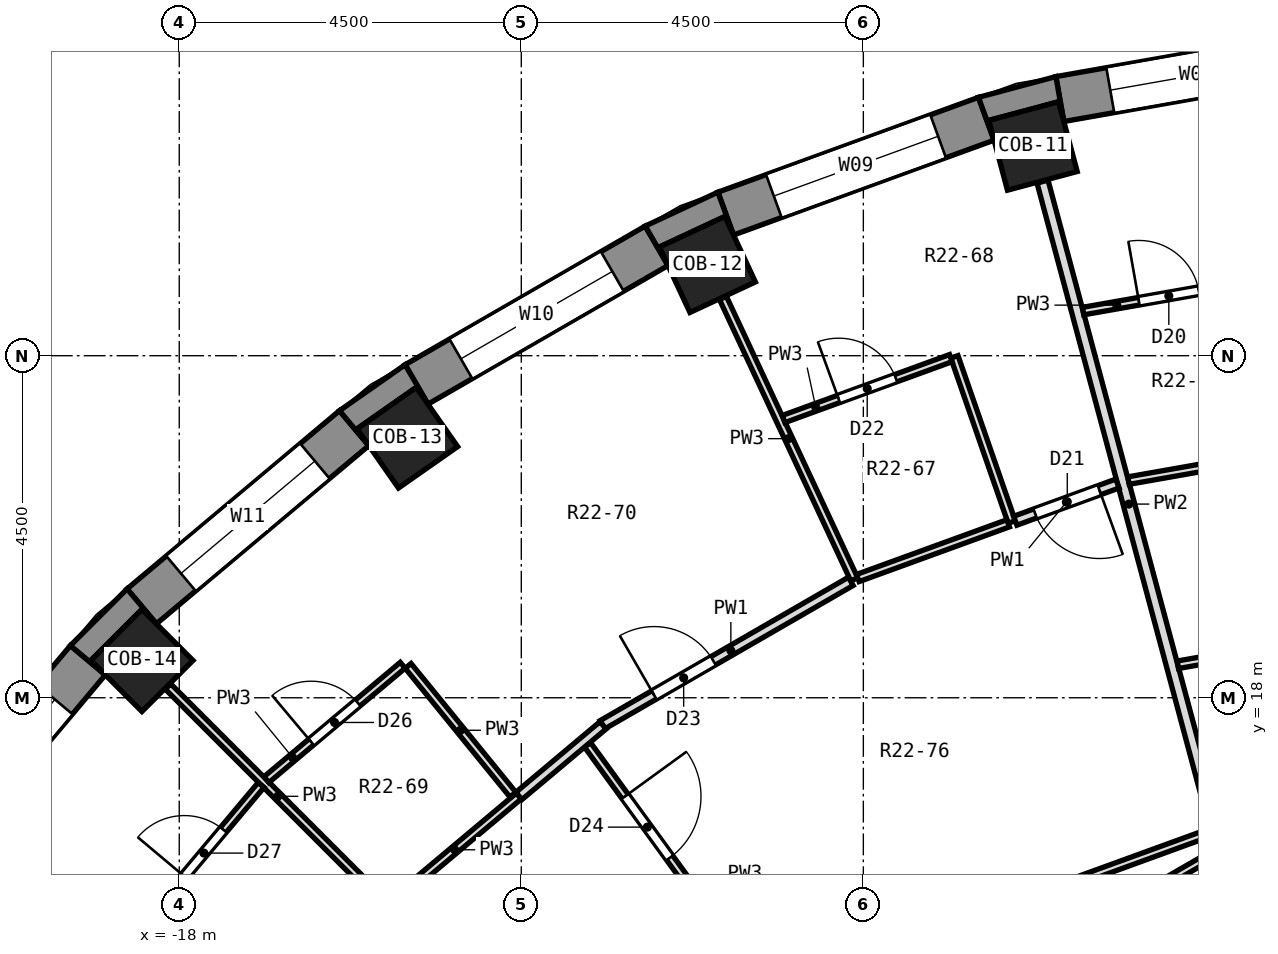
"""IFC4 building model, lengths in metres.
Left out: names, types, materials, properties, quantities, classifications, styles, units other than length and angle.
Written with IfcOpenShell. Run it as: python <this file> out.ifc"""

import sys

from ifc_helpers import new_model, si_unit, direction, frame, frame_2d, origin, origin_2d, place, context, subcontext, project, spatial, polyline, rectangle, outline, extrude, element, fill, save


model = new_model("IFC4")
c1 = context("Model", 3, precision=1e-05, world=origin(), true_north=direction((0.0, 1.0)))
c2 = subcontext(c1, "Body", "Model", "MODEL_VIEW")
j1 = project(units=[si_unit("LENGTHUNIT", "METRE"), si_unit("PLANEANGLEUNIT", "RADIAN")], contexts=[c1])
p1 = place(None, origin())
s1 = spatial("IfcSite", under=j1, at=p1, CompositionType="ELEMENT")
p2 = place(p1, origin())
s2 = spatial("IfcBuilding", under=s1, at=p2, CompositionType="ELEMENT")
p3 = place(p2, frame((0.0, 0.0, 141.4)))
s3 = spatial("IfcBuildingStorey", under=s2, at=p3, CompositionType="ELEMENT", Elevation=141.4)
for number, where, z_axis, x_axis in (
    (1, (-6.768, 25.259, 0.0), (0.0, 0.0, 1.0), (-0.259, 0.966, 0.0)),
    (2, (-11.052, 23.7, 0.0), (0.0, 0.0, 1.0), (-0.423, 0.906, 0.0)),
    (3, (-14.999, 21.421, 0.0), (0.0, 0.0, 1.0), (-0.574, 0.819, 0.0)),
    (4, (-18.491, 18.491, 0.0), (0.0, 0.0, 1.0), (-0.707, 0.707, 0.0)),
):
    element("IfcColumn", number, at=place(p3, frame(where, z_axis=z_axis, x_axis=x_axis)), inside=s3, PredefinedType="COLUMN", context=c2, shape_type="SweptSolid", body=[
        extrude(rectangle(XDim=0.95, YDim=0.95, at=origin_2d()), origin(), (0.0, 0.0, 1.0), 3.3),
    ])
p4 = place(p3, frame((-2.822, 26.51, 0.0), z_axis=(0.0, 0.0, 1.0), x_axis=(-0.984803764455, -0.173670796382, 0.0)))
e5 = element("IfcWall", 5, at=p4, inside=s3, PredefinedType="SOLIDWALL", context=c2, shape_type="SweptSolid", body=[
    extrude(rectangle(XDim=3.648, YDim=0.6, at=frame_2d((1.824, 0.0))), origin(), (0.0, 0.0, 1.0), 2.8),
])
p5 = place(p4, frame((0.674, 0.0, 0.9)))
e6 = element("IfcOpeningElement", 6, at=p5, cuts=e5, PredefinedType="OPENING", context=c2, shape_type="SweptSolid", body=[
    extrude(rectangle(XDim=2.3, YDim=1.8, at=frame_2d((1.15, 0.9))), frame((0.0, 0.312, 0.0), z_axis=(0.0, -1.0, 0.0), x_axis=(1.0, 0.0, 0.0)), (0.0, 0.0, 1.0), 0.624),
])
p6 = place(p3, frame((-7.383, 25.617, 0.0), z_axis=(0.0, 0.0, 1.0), x_axis=(-0.939703505393, -0.341990236633, 0.0)))
e7 = element("IfcWall", 7, at=p6, inside=s3, PredefinedType="SOLIDWALL", context=c2, shape_type="SweptSolid", body=[
    extrude(rectangle(XDim=3.648, YDim=0.6, at=frame_2d((1.824, 0.0))), origin(), (0.0, 0.0, 1.0), 2.8),
])
p7 = place(p6, frame((0.674, 0.0, 0.9)))
e8 = element("IfcOpeningElement", 8, at=p7, cuts=e7, PredefinedType="OPENING", context=c2, shape_type="SweptSolid", body=[
    extrude(rectangle(XDim=2.3, YDim=1.8, at=frame_2d((1.15, 0.9))), frame((0.0, 0.312, 0.0), z_axis=(0.0, -1.0, 0.0), x_axis=(1.0, 0.0, 0.0)), (0.0, 0.0, 1.0), 0.624),
])
p8 = place(p3, frame((-11.719, 23.946, 0.0), z_axis=(0.0, 0.0, 1.0), x_axis=(-0.866051847062, -0.499954196102, 0.0)))
e9 = element("IfcWall", 9, at=p8, inside=s3, PredefinedType="SOLIDWALL", context=c2, shape_type="SweptSolid", body=[
    extrude(rectangle(XDim=3.648, YDim=0.6, at=frame_2d((1.824, 0.0))), origin(), (0.0, 0.0, 1.0), 2.8),
])
p9 = place(p8, frame((0.674, 0.0, 0.9)))
e10 = element("IfcOpeningElement", 10, at=p9, cuts=e9, PredefinedType="OPENING", context=c2, shape_type="SweptSolid", body=[
    extrude(rectangle(XDim=2.3, YDim=1.8, at=frame_2d((1.15, 0.9))), frame((0.0, 0.312, 0.0), z_axis=(0.0, -1.0, 0.0), x_axis=(1.0, 0.0, 0.0)), (0.0, 0.0, 1.0), 0.624),
])
p10 = place(p3, frame((-15.699, 21.547, 0.0), z_axis=(0.0, 0.0, 1.0), x_axis=(-0.766055462616, -0.642774476932, 0.0)))
e11 = element("IfcWall", 11, at=p10, inside=s3, PredefinedType="SOLIDWALL", context=c2, shape_type="SweptSolid", body=[
    extrude(rectangle(XDim=3.648, YDim=0.6, at=frame_2d((1.824, 0.0))), origin(), (0.0, 0.0, 1.0), 2.8),
])
p11 = place(p10, frame((0.674, 0.0, 0.9)))
e12 = element("IfcOpeningElement", 12, at=p11, cuts=e11, PredefinedType="OPENING", context=c2, shape_type="SweptSolid", body=[
    extrude(rectangle(XDim=2.3, YDim=1.8, at=frame_2d((1.15, 0.9))), frame((0.0, 0.312, 0.0), z_axis=(0.0, -1.0, 0.0), x_axis=(1.0, 0.0, 0.0)), (0.0, 0.0, 1.0), 0.624),
])
p12 = place(p3, frame((-19.202, 18.494, 0.0), z_axis=(0.0, 0.0, 1.0), x_axis=(-0.642774476932, -0.766055462616, 0.0)))
e13 = element("IfcWall", 13, at=p12, inside=s3, PredefinedType="SOLIDWALL", context=c2, shape_type="SweptSolid", body=[
    extrude(rectangle(XDim=3.648, YDim=0.6, at=frame_2d((1.824, 0.0))), origin(), (0.0, 0.0, 1.0), 2.8),
])
p13 = place(p12, frame((0.674, 0.0, 0.9)))
e14 = element("IfcOpeningElement", 14, at=p13, cuts=e13, PredefinedType="OPENING", context=c2, shape_type="SweptSolid", body=[
    extrude(rectangle(XDim=2.3, YDim=1.8, at=frame_2d((1.15, 0.9))), frame((0.0, 0.312, 0.0), z_axis=(0.0, -1.0, 0.0), x_axis=(1.0, 0.0, 0.0)), (0.0, 0.0, 1.0), 0.624),
])
p14 = place(p3, origin())
e15 = element("IfcWall", 15, at=p14, inside=s3, PredefinedType="SOLIDWALL", context=c2, shape_type="SweptSolid", body=[
    extrude(outline(polyline([(-6.467, 26.172), (-7.486, 25.899), (-7.28, 25.335), (-7.35, 25.595), (-6.432, 25.841), (-6.363, 25.581), (-6.467, 26.172)])), origin(), (0.0, 0.0, 1.0), 2.8),
])
p15 = place(p3, origin())
e16 = element("IfcWall", 16, at=p15, inside=s3, PredefinedType="SOLIDWALL", context=c2, shape_type="SweptSolid", body=[
    extrude(outline(polyline([(-10.913, 24.651), (-11.869, 24.206), (-11.569, 23.686), (-11.683, 23.93), (-10.822, 24.331), (-10.708, 24.087), (-10.913, 24.651)])), origin(), (0.0, 0.0, 1.0), 2.8),
])
p16 = place(p3, origin())
e17 = element("IfcWall", 17, at=p16, inside=s3, PredefinedType="SOLIDWALL", context=c2, shape_type="SweptSolid", body=[
    extrude(outline(polyline([(-15.892, 21.777), (-15.506, 21.317), (-15.661, 21.538), (-14.882, 22.083), (-14.728, 21.862), (-15.028, 22.382), (-15.892, 21.777)])), origin(), (0.0, 0.0, 1.0), 2.8),
])
p17 = place(p3, origin())
e18 = element("IfcWall", 18, at=p17, inside=s3, PredefinedType="SOLIDWALL", context=c2, shape_type="SweptSolid", body=[
    extrude(outline(polyline([(-18.686, 19.432), (-19.432, 18.686), (-18.972, 18.301), (-19.163, 18.491), (-18.491, 19.163), (-18.301, 18.972), (-18.686, 19.432)])), origin(), (0.0, 0.0, 1.0), 2.8),
])
p18 = place(p3, frame((-6.643, 24.791, 0.0), z_axis=(0.0, 0.0, 1.0), x_axis=(0.258629569049, -0.965976576328, 0.0)))
e19 = element("IfcWall", 19, at=p18, inside=s3, PredefinedType="PARTITIONING", context=c2, shape_type="SweptSolid", body=[
    extrude(rectangle(XDim=8.784, YDim=0.15, at=frame_2d((4.392, 0.0))), origin(), (0.0, 0.0, 1.0), 2.8),
])
p19 = place(p3, frame((-7.802, 22.485, 0.0), z_axis=(0.0, 0.0, 1.0), x_axis=(0.327763034971, -0.944759965762, 0.0)))
e20 = element("IfcWall", 20, at=p19, inside=s3, PredefinedType="PARTITIONING", context=c2, shape_type="SweptSolid", body=[
    extrude(rectangle(XDim=2.3, YDim=0.1, at=frame_2d((1.15, 0.0))), origin(), (0.0, 0.0, 1.0), 2.8),
])
p20 = place(p3, frame((-10.847, 23.26, 0.0), z_axis=(0.0, 0.0, 1.0), x_axis=(0.422784035137, -0.906230467173, 0.0)))
e21 = element("IfcWall", 21, at=p20, inside=s3, PredefinedType="PARTITIONING", context=c2, shape_type="SweptSolid", body=[
    extrude(rectangle(XDim=4.085, YDim=0.1, at=frame_2d((2.042, 0.0))), origin(), (0.0, 0.0, 1.0), 2.8),
])
p21 = place(p3, frame((-12.629, 17.382, 0.0), z_axis=(0.0, 0.0, 1.0), x_axis=(0.587934886014, -0.808908257967, 0.0)))
e22 = element("IfcWall", 22, at=p21, inside=s3, PredefinedType="PARTITIONING", context=c2, shape_type="SweptSolid", body=[
    extrude(rectangle(XDim=5.395, YDim=0.1, at=frame_2d((2.698, 0.0))), origin(), (0.0, 0.0, 1.0), 2.8),
])
p22 = place(p21, frame((0.84, 0.0, 0.0)))
e23 = element("IfcOpeningElement", 23, at=p22, cuts=e22, PredefinedType="OPENING", context=c2, shape_type="SweptSolid", body=[
    extrude(rectangle(XDim=1.0, YDim=2.1, at=frame_2d((0.5, 1.05))), frame((0.0, 0.062, 0.0), z_axis=(0.0, -1.0, 0.0), x_axis=(1.0, 0.0, 0.0)), (0.0, 0.0, 1.0), 0.124),
])
p23 = place(p3, frame((-14.989, 18.419, 0.0), z_axis=(0.0, 0.0, 1.0), x_axis=(0.63124481093, -0.775583643893, 0.0)))
e24 = element("IfcWall", 24, at=p23, inside=s3, PredefinedType="PARTITIONING", context=c2, shape_type="SweptSolid", body=[
    extrude(rectangle(XDim=2.184, YDim=0.1, at=frame_2d((1.092, 0.0))), origin(), (0.0, 0.0, 1.0), 2.8),
])
p24 = place(p3, frame((-18.148, 18.148, 0.0), z_axis=(0.0, 0.0, 1.0), x_axis=(0.707106781187, -0.707106781187, 0.0)))
e25 = element("IfcWall", 25, at=p24, inside=s3, PredefinedType="PARTITIONING", context=c2, shape_type="SweptSolid", body=[
    extrude(rectangle(XDim=4.085, YDim=0.1, at=frame_2d((2.043, 0.0))), origin(), (0.0, 0.0, 1.0), 2.8),
])
p25 = place(p3, frame((-4.862, 18.434, 0.0), z_axis=(0.0, 0.0, 1.0), x_axis=(0.984777412926, 0.173820157031, 0.0)))
e26 = element("IfcWall", 26, at=p25, inside=s3, PredefinedType="PARTITIONING", context=c2, shape_type="SweptSolid", body=[
    extrude(rectangle(XDim=3.199, YDim=0.1, at=frame_2d((1.6, 0.0))), origin(), (0.0, 0.0, 1.0), 2.8),
])
p26 = place(p3, frame((-5.511, 20.857, 0.0), z_axis=(0.0, 0.0, 1.0), x_axis=(0.984775352835, 0.173831828066, 0.0)))
e27 = element("IfcWall", 27, at=p26, inside=s3, PredefinedType="PARTITIONING", context=c2, shape_type="SweptSolid", body=[
    extrude(rectangle(XDim=2.097, YDim=0.1, at=frame_2d((1.048, 0.0))), origin(), (0.0, 0.0, 1.0), 2.8),
])
p27 = place(p3, frame((-6.109, 23.087, 0.0), z_axis=(0.0, 0.0, 1.0), x_axis=(0.984797350308, 0.173707164006, 0.0)))
e28 = element("IfcWall", 28, at=p27, inside=s3, PredefinedType="PARTITIONING", context=c2, shape_type="SweptSolid", body=[
    extrude(rectangle(XDim=2.316, YDim=0.1, at=frame_2d((1.158, 0.0))), origin(), (0.0, 0.0, 1.0), 2.8),
])
p28 = place(p27, frame((0.746, 0.0, 0.0)))
e29 = element("IfcOpeningElement", 29, at=p28, cuts=e28, PredefinedType="OPENING", context=c2, shape_type="SweptSolid", body=[
    extrude(rectangle(XDim=0.8, YDim=2.1, at=frame_2d((0.4, 1.05))), frame((0.0, 0.062, 0.0), z_axis=(0.0, -1.0, 0.0), x_axis=(1.0, 0.0, 0.0)), (0.0, 0.0, 1.0), 0.124),
])
p29 = place(p3, frame((-7.161, 15.238, 0.0), z_axis=(0.0, 0.0, 1.0), x_axis=(0.939722354216, 0.341938440346, 0.0)))
e30 = element("IfcWall", 30, at=p29, inside=s3, PredefinedType="PARTITIONING", context=c2, shape_type="SweptSolid", body=[
    extrude(rectangle(XDim=2.909, YDim=0.1, at=frame_2d((1.455, 0.0))), origin(), (0.0, 0.0, 1.0), 2.8),
])
p30 = place(p3, frame((-9.073, 19.575, 0.0), z_axis=(0.0, 0.0, 1.0), x_axis=(0.939725675468, 0.341929312674, 0.0)))
e31 = element("IfcWall", 31, at=p30, inside=s3, PredefinedType="PARTITIONING", context=c2, shape_type="SweptSolid", body=[
    extrude(rectangle(XDim=2.105, YDim=0.1, at=frame_2d((1.052, 0.0))), origin(), (0.0, 0.0, 1.0), 2.8),
])
p31 = place(p3, frame((-7.001, 20.329, 0.0), z_axis=(0.0, 0.0, 1.0), x_axis=(0.939788441711, 0.341756762663, 0.0)))
e32 = element("IfcWall", 32, at=p31, inside=s3, PredefinedType="PARTITIONING", context=c2, shape_type="SweptSolid", body=[
    extrude(rectangle(XDim=1.431, YDim=0.125, at=frame_2d((0.715, 0.0))), origin(), (0.0, 0.0, 1.0), 2.8),
])
p32 = place(p31, frame((0.278, 0.0, 0.0)))
e33 = element("IfcOpeningElement", 33, at=p32, cuts=e32, PredefinedType="OPENING", context=c2, shape_type="SweptSolid", body=[
    extrude(rectangle(XDim=0.9, YDim=2.1, at=frame_2d((0.45, 1.05))), frame((0.0, 0.074, 0.0), z_axis=(0.0, -1.0, 0.0), x_axis=(1.0, 0.0, 0.0)), (0.0, 0.0, 1.0), 0.149),
])
p33 = place(p3, frame((-10.049, 21.667, 0.0), z_axis=(0.0, 0.0, 1.0), x_axis=(0.939662448837, 0.342103028699, 0.0)))
e34 = element("IfcWall", 34, at=p33, inside=s3, PredefinedType="PARTITIONING", context=c2, shape_type="SweptSolid", body=[
    extrude(rectangle(XDim=2.342, YDim=0.1, at=frame_2d((1.171, 0.0))), origin(), (0.0, 0.0, 1.0), 2.8),
])
p34 = place(p33, frame((0.771, 0.0, 0.0)))
e35 = element("IfcOpeningElement", 35, at=p34, cuts=e34, PredefinedType="OPENING", context=c2, shape_type="SweptSolid", body=[
    extrude(rectangle(XDim=0.8, YDim=2.1, at=frame_2d((0.4, 1.05))), frame((0.0, 0.062, 0.0), z_axis=(0.0, -1.0, 0.0), x_axis=(1.0, 0.0, 0.0)), (0.0, 0.0, 1.0), 0.124),
])
p35 = place(p3, frame((-9.414, 13.043, 0.0), z_axis=(0.0, 0.0, 1.0), x_axis=(0.866050468633, 0.499956583896, 0.0)))
e36 = element("IfcWall", 36, at=p35, inside=s3, PredefinedType="PARTITIONING", context=c2, shape_type="SweptSolid", body=[
    extrude(rectangle(XDim=5.867, YDim=0.1, at=frame_2d((2.934, 0.0))), origin(), (0.0, 0.0, 1.0), 2.8),
])
p36 = place(p3, frame((-12.432, 17.645, 0.0), z_axis=(0.0, 0.0, 1.0), x_axis=(0.866012062527, 0.500023107024, 0.0)))
e37 = element("IfcWall", 37, at=p36, inside=s3, PredefinedType="PARTITIONING", context=c2, shape_type="SweptSolid", body=[
    extrude(rectangle(XDim=3.772, YDim=0.125, at=frame_2d((1.886, 0.0))), origin(), (0.0, 0.0, 1.0), 2.8),
])
p37 = place(p36, frame((0.783, 0.0, 0.0)))
e38 = element("IfcOpeningElement", 38, at=p37, cuts=e37, PredefinedType="OPENING", context=c2, shape_type="SweptSolid", body=[
    extrude(rectangle(XDim=0.9, YDim=2.1, at=frame_2d((0.45, 1.05))), frame((0.0, 0.074, 0.0), z_axis=(0.0, -1.0, 0.0), x_axis=(1.0, 0.0, 0.0)), (0.0, 0.0, 1.0), 0.149),
])
p38 = place(p3, frame((-15.22, 15.292, 0.0), z_axis=(0.0, 0.0, 1.0), x_axis=(0.766073622953, 0.642752832911, 0.0)))
e39 = element("IfcWall", 39, at=p38, inside=s3, PredefinedType="PARTITIONING", context=c2, shape_type="SweptSolid", body=[
    extrude(rectangle(XDim=2.203, YDim=0.1, at=frame_2d((1.102, 0.0))), origin(), (0.0, 0.0, 1.0), 2.8),
])
p39 = place(p3, frame((-13.532, 16.708, 0.0), z_axis=(0.0, 0.0, 1.0), x_axis=(0.766167387458, 0.642641061866, 0.0)))
e40 = element("IfcWall", 40, at=p39, inside=s3, PredefinedType="PARTITIONING", context=c2, shape_type="SweptSolid", body=[
    extrude(rectangle(XDim=1.445, YDim=0.125, at=frame_2d((0.722, 0.0))), origin(), (0.0, 0.0, 1.0), 2.8),
])
p40 = place(p3, frame((-16.853, 16.923, 0.0), z_axis=(0.0, 0.0, 1.0), x_axis=(0.765924716163, 0.642930267735, 0.0)))
e41 = element("IfcWall", 41, at=p40, inside=s3, PredefinedType="PARTITIONING", context=c2, shape_type="SweptSolid", body=[
    extrude(rectangle(XDim=2.34, YDim=0.1, at=frame_2d((1.17, 0.0))), origin(), (0.0, 0.0, 1.0), 2.8),
])
p41 = place(p40, frame((0.769, 0.0, 0.0)))
e42 = element("IfcOpeningElement", 42, at=p41, cuts=e41, PredefinedType="OPENING", context=c2, shape_type="SweptSolid", body=[
    extrude(rectangle(XDim=0.8, YDim=2.1, at=frame_2d((0.4, 1.05))), frame((0.0, 0.062, 0.0), z_axis=(0.0, -1.0, 0.0), x_axis=(1.0, 0.0, 0.0)), (0.0, 0.0, 1.0), 0.124),
])
p42 = place(p3, frame((-18.428, 15.06, 0.0), z_axis=(0.0, 0.0, 1.0), x_axis=(0.642930267735, 0.765924716163, 0.0)))
e43 = element("IfcWall", 43, at=p42, inside=s3, PredefinedType="PARTITIONING", context=c2, shape_type="SweptSolid", body=[
    extrude(rectangle(XDim=2.34, YDim=0.1, at=frame_2d((1.17, 0.0))), origin(), (0.0, 0.0, 1.0), 2.8),
])
p43 = place(p42, frame((0.77, 0.0, 0.0)))
e44 = element("IfcOpeningElement", 44, at=p43, cuts=e43, PredefinedType="OPENING", context=c2, shape_type="SweptSolid", body=[
    extrude(rectangle(XDim=0.8, YDim=2.1, at=frame_2d((0.4, 1.05))), frame((0.0, 0.062, 0.0), z_axis=(0.0, -1.0, 0.0), x_axis=(1.0, 0.0, 0.0)), (0.0, 0.0, 1.0), 0.124),
])
p44 = place(p5, origin())
e45 = element("IfcWindow", 45, at=p44, inside=s3, PartitioningType="SINGLE_PANEL", PredefinedType="WINDOW", context=c2, shape_type="SweptSolid", body=[
    extrude(rectangle(XDim=2.3, YDim=1.8, at=frame_2d((1.15, 0.9))), frame((0.0, 0.18, 0.0), z_axis=(0.0, -1.0, 0.0), x_axis=(1.0, 0.0, 0.0)), (0.0, 0.0, 1.0), 0.06),
])
fill(e6, e45)
p45 = place(p7, origin())
e46 = element("IfcWindow", 46, at=p45, inside=s3, PartitioningType="SINGLE_PANEL", PredefinedType="WINDOW", context=c2, shape_type="SweptSolid", body=[
    extrude(rectangle(XDim=2.3, YDim=1.8, at=frame_2d((1.15, 0.9))), frame((0.0, 0.18, 0.0), z_axis=(0.0, -1.0, 0.0), x_axis=(1.0, 0.0, 0.0)), (0.0, 0.0, 1.0), 0.06),
])
fill(e8, e46)
p46 = place(p9, origin())
e47 = element("IfcWindow", 47, at=p46, inside=s3, PartitioningType="SINGLE_PANEL", PredefinedType="WINDOW", context=c2, shape_type="SweptSolid", body=[
    extrude(rectangle(XDim=2.3, YDim=1.8, at=frame_2d((1.15, 0.9))), frame((0.0, 0.18, 0.0), z_axis=(0.0, -1.0, 0.0), x_axis=(1.0, 0.0, 0.0)), (0.0, 0.0, 1.0), 0.06),
])
fill(e10, e47)
p47 = place(p11, origin())
e48 = element("IfcWindow", 48, at=p47, inside=s3, PartitioningType="SINGLE_PANEL", PredefinedType="WINDOW", context=c2, shape_type="SweptSolid", body=[
    extrude(rectangle(XDim=2.3, YDim=1.8, at=frame_2d((1.15, 0.9))), frame((0.0, 0.18, 0.0), z_axis=(0.0, -1.0, 0.0), x_axis=(1.0, 0.0, 0.0)), (0.0, 0.0, 1.0), 0.06),
])
fill(e12, e48)
p48 = place(p13, origin())
e49 = element("IfcWindow", 49, at=p48, inside=s3, PartitioningType="SINGLE_PANEL", PredefinedType="WINDOW", context=c2, shape_type="SweptSolid", body=[
    extrude(rectangle(XDim=2.3, YDim=1.8, at=frame_2d((1.15, 0.9))), frame((0.0, 0.18, 0.0), z_axis=(0.0, -1.0, 0.0), x_axis=(1.0, 0.0, 0.0)), (0.0, 0.0, 1.0), 0.06),
])
fill(e14, e49)
p49 = place(p28, origin())
e50 = element("IfcDoor", 50, at=p49, inside=s3, OperationType="SINGLE_SWING_LEFT", PredefinedType="DOOR", context=c2, shape_type="SweptSolid", body=[
    extrude(rectangle(XDim=0.8, YDim=2.1, at=frame_2d((0.4, 1.05))), frame((0.0, 0.025, 0.0), z_axis=(0.0, -1.0, 0.0), x_axis=(1.0, 0.0, 0.0)), (0.0, 0.0, 1.0), 0.05),
])
fill(e29, e50)
p50 = place(p32, frame((0.9, 0.0, 0.0), z_axis=(0.0, 0.0, 1.0), x_axis=(-1.0, 0.0, 0.0)))
e51 = element("IfcDoor", 51, at=p50, inside=s3, OperationType="SINGLE_SWING_LEFT", PredefinedType="DOOR", context=c2, shape_type="SweptSolid", body=[
    extrude(rectangle(XDim=0.9, YDim=2.1, at=frame_2d((0.45, 1.05))), frame((0.0, 0.025, 0.0), z_axis=(0.0, -1.0, 0.0), x_axis=(1.0, 0.0, 0.0)), (0.0, 0.0, 1.0), 0.05),
])
fill(e33, e51)
p51 = place(p34, origin())
e52 = element("IfcDoor", 52, at=p51, inside=s3, OperationType="SINGLE_SWING_LEFT", PredefinedType="DOOR", context=c2, shape_type="SweptSolid", body=[
    extrude(rectangle(XDim=0.8, YDim=2.1, at=frame_2d((0.4, 1.05))), frame((0.0, 0.025, 0.0), z_axis=(0.0, -1.0, 0.0), x_axis=(1.0, 0.0, 0.0)), (0.0, 0.0, 1.0), 0.05),
])
fill(e35, e52)
p52 = place(p37, origin())
e53 = element("IfcDoor", 53, at=p52, inside=s3, OperationType="SINGLE_SWING_LEFT", PredefinedType="DOOR", context=c2, shape_type="SweptSolid", body=[
    extrude(rectangle(XDim=0.9, YDim=2.1, at=frame_2d((0.45, 1.05))), frame((0.0, 0.025, 0.0), z_axis=(0.0, -1.0, 0.0), x_axis=(1.0, 0.0, 0.0)), (0.0, 0.0, 1.0), 0.05),
])
fill(e38, e53)
p53 = place(p22, origin())
e54 = element("IfcDoor", 54, at=p53, inside=s3, OperationType="SINGLE_SWING_LEFT", PredefinedType="DOOR", context=c2, shape_type="SweptSolid", body=[
    extrude(rectangle(XDim=1.0, YDim=2.1, at=frame_2d((0.5, 1.05))), frame((0.0, 0.025, 0.0), z_axis=(0.0, -1.0, 0.0), x_axis=(1.0, 0.0, 0.0)), (0.0, 0.0, 1.0), 0.05),
])
fill(e23, e54)
p54 = place(p41, origin())
e55 = element("IfcDoor", 55, at=p54, inside=s3, OperationType="SINGLE_SWING_LEFT", PredefinedType="DOOR", context=c2, shape_type="SweptSolid", body=[
    extrude(rectangle(XDim=0.8, YDim=2.1, at=frame_2d((0.4, 1.05))), frame((0.0, 0.025, 0.0), z_axis=(0.0, -1.0, 0.0), x_axis=(1.0, 0.0, 0.0)), (0.0, 0.0, 1.0), 0.05),
])
fill(e42, e55)
p55 = place(p43, origin())
e56 = element("IfcDoor", 56, at=p55, inside=s3, OperationType="SINGLE_SWING_LEFT", PredefinedType="DOOR", context=c2, shape_type="SweptSolid", body=[
    extrude(rectangle(XDim=0.8, YDim=2.1, at=frame_2d((0.4, 1.05))), frame((0.0, 0.025, 0.0), z_axis=(0.0, -1.0, 0.0), x_axis=(1.0, 0.0, 0.0)), (0.0, 0.0, 1.0), 0.05),
])
fill(e44, e56)
save(model, sys.argv[1])
